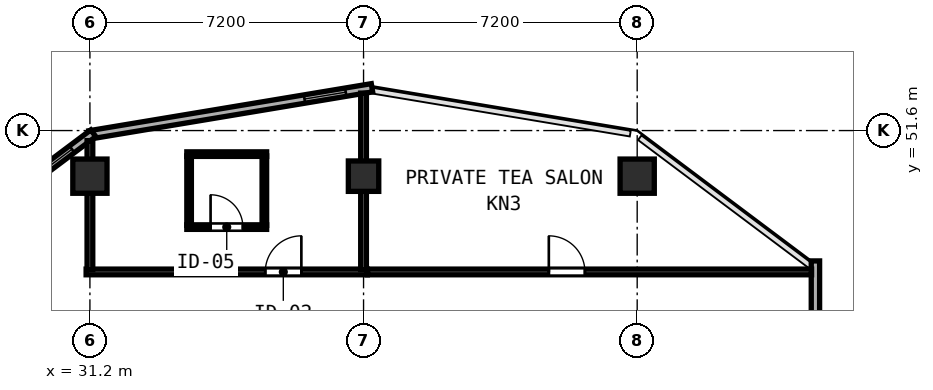
"""IFC4 building model, lengths in metres.
Left out: names, types, materials, properties, quantities, classifications, styles, units other than length and angle.
Written with IfcOpenShell. Run it as: python <this file> out.ifc"""

import sys

from ifc_helpers import new_model, si_unit, direction, frame, frame_2d, origin, origin_2d, place, context, subcontext, project, spatial, rectangle, hollow_rectangle, extrude, element, fill, save


model = new_model("IFC4")
c1 = context("Model", 3, precision=1e-05, world=origin(), true_north=direction((0.0, 1.0)))
c2 = subcontext(c1, "Body", "Model", "MODEL_VIEW")
j1 = project(units=[si_unit("LENGTHUNIT", "METRE"), si_unit("PLANEANGLEUNIT", "RADIAN")], contexts=[c1])
p1 = place(None, origin())
s1 = spatial("IfcSite", under=j1, at=p1, CompositionType="ELEMENT")
p2 = place(p1, origin())
s2 = spatial("IfcBuilding", under=s1, at=p2, CompositionType="ELEMENT")
p3 = place(p2, frame((0.0, 0.0, 223.0)))
s3 = spatial("IfcBuildingStorey", under=s2, at=p3, CompositionType="ELEMENT", Elevation=223.0)
for number, where, z_axis, x_axis in (
    (1, (31.2, 50.4, 0.0), (0.0, 0.0, 1.0), (1.0, 0.0, 0.0)),
    (2, (45.6, 50.4, 0.0), (0.0, 0.0, 1.0), (1.0, 0.0, 0.0)),
):
    element("IfcColumn", number, at=place(p3, frame(where, z_axis=z_axis, x_axis=x_axis)), inside=s3, PredefinedType="COLUMN", context=c2, shape_type="SweptSolid", body=[
        extrude(hollow_rectangle(XDim=0.9, YDim=0.9, WallThickness=0.034, at=origin_2d()), origin(), (0.0, 0.0, 1.0), 3.8),
    ])
p4 = place(p3, frame((38.4, 50.4, 0.0), z_axis=(0.0, 0.0, 1.0), x_axis=(1.0, 0.0, 0.0)))
e3 = element("IfcColumn", 3, at=p4, inside=s3, PredefinedType="COLUMN", context=c2, shape_type="SweptSolid", body=[
    extrude(hollow_rectangle(XDim=0.8, YDim=0.8, WallThickness=0.03, at=origin_2d()), origin(), (0.0, 0.0, 1.0), 3.8),
])
p5 = place(p3, frame((50.29, 46.635, 0.0), z_axis=(0.0, 0.0, 1.0), x_axis=(0.0, 1.0, 0.0)))
e4 = element("IfcWall", 4, at=p5, inside=s3, PredefinedType="SOLIDWALL", context=c2, shape_type="SweptSolid", body=[
    extrude(rectangle(XDim=1.535, YDim=0.22, at=frame_2d((0.768, 0.0))), origin(), (0.0, 0.0, 1.0), 3.62),
])
p6 = place(p3, frame((38.622, 52.726, 0.0), z_axis=(0.0, 0.0, 1.0), x_axis=(-0.986390420428, -0.164420006349, 0.0)))
e5 = element("IfcWall", 5, at=p6, inside=s3, PredefinedType="SOLIDWALL", context=c2, shape_type="SweptSolid", body=[
    extrude(rectangle(XDim=7.534, YDim=0.22, at=frame_2d((3.767, 0.0))), origin(), (0.0, 0.0, 1.0), 3.62),
])
p7 = place(p6, frame((0.7, 0.0, 0.85)))
e6 = element("IfcOpeningElement", 6, at=p7, cuts=e5, PredefinedType="OPENING", context=c2, shape_type="SweptSolid", body=[
    extrude(rectangle(XDim=1.1, YDim=1.75, at=frame_2d((0.55, 0.875))), frame((0.0, 0.12, 0.0), z_axis=(0.0, -1.0, 0.0), x_axis=(1.0, 0.0, 0.0)), (0.0, 0.0, 1.0), 0.24),
])
p8 = place(p3, frame((31.289, 51.529, 0.0), z_axis=(0.0, 0.0, 1.0), x_axis=(-0.800014580093, -0.599980559383, 0.0)))
e7 = element("IfcWall", 7, at=p8, inside=s3, PredefinedType="SOLIDWALL", context=c2, shape_type="SweptSolid", body=[
    extrude(rectangle(XDim=6.028, YDim=0.22, at=frame_2d((3.014, 0.0))), origin(), (0.0, 0.0, 1.0), 3.62),
])
p9 = place(p8, frame((0.7, 0.0, 0.85)))
e8 = element("IfcOpeningElement", 8, at=p9, cuts=e7, PredefinedType="OPENING", context=c2, shape_type="SweptSolid", body=[
    extrude(rectangle(XDim=1.1, YDim=1.75, at=frame_2d((0.55, 0.875))), frame((0.0, 0.12, 0.0), z_axis=(0.0, -1.0, 0.0), x_axis=(1.0, 0.0, 0.0)), (0.0, 0.0, 1.0), 0.24),
])
p10 = place(p3, frame((31.1, 47.88, 0.0), z_axis=(0.0, 0.0, 1.0), x_axis=(1.0, 0.0, 0.0)))
e9 = element("IfcWall", 9, at=p10, inside=s3, PredefinedType="PARTITIONING", context=c2, shape_type="SweptSolid", body=[
    extrude(rectangle(XDim=7.4, YDim=0.15, at=frame_2d((3.7, 0.0))), origin(), (0.0, 0.0, 1.0), 3.62),
])
p11 = place(p10, frame((4.714, 0.0, 0.0)))
e10 = element("IfcOpeningElement", 10, at=p11, cuts=e9, PredefinedType="OPENING", context=c2, shape_type="SweptSolid", body=[
    extrude(rectangle(XDim=0.95, YDim=2.15, at=frame_2d((0.475, 1.075))), frame((0.0, 0.085, 0.0), z_axis=(0.0, -1.0, 0.0), x_axis=(1.0, 0.0, 0.0)), (0.0, 0.0, 1.0), 0.17),
])
p12 = place(p3, frame((31.2, 47.94, 0.0), z_axis=(0.0, 0.0, 1.0), x_axis=(0.0, 1.0, 0.0)))
e11 = element("IfcWall", 11, at=p12, inside=s3, PredefinedType="PARTITIONING", context=c2, shape_type="SweptSolid", body=[
    extrude(rectangle(XDim=3.395, YDim=0.15, at=frame_2d((1.698, 0.0))), origin(), (0.0, 0.0, 1.0), 3.105),
])
p13 = place(p3, frame((38.4, 47.94, 0.0), z_axis=(0.0, 0.0, 1.0), x_axis=(0.0, 1.0, 0.0)))
e12 = element("IfcWall", 12, at=p13, inside=s3, PredefinedType="PARTITIONING", context=c2, shape_type="SweptSolid", body=[
    extrude(rectangle(XDim=4.645, YDim=0.15, at=frame_2d((2.323, 0.0))), origin(), (0.0, 0.0, 1.0), 3.62),
])
p14 = place(p3, frame((33.75, 50.98, 0.0), z_axis=(0.0, 0.0, 1.0), x_axis=(1.0, 0.0, 0.0)))
e13 = element("IfcWall", 13, at=p14, inside=s3, PredefinedType="PARTITIONING", context=c2, shape_type="SweptSolid", body=[
    extrude(rectangle(XDim=2.1, YDim=0.12, at=frame_2d((1.05, 0.0))), origin(), (0.0, 0.0, 1.0), 3.62),
])
p15 = place(p3, frame((33.75, 49.06, 0.0), z_axis=(0.0, 0.0, 1.0), x_axis=(1.0, 0.0, 0.0)))
e14 = element("IfcWall", 14, at=p15, inside=s3, PredefinedType="PARTITIONING", context=c2, shape_type="SweptSolid", body=[
    extrude(rectangle(XDim=2.1, YDim=0.12, at=frame_2d((1.05, 0.0))), origin(), (0.0, 0.0, 1.0), 3.62),
])
p16 = place(p15, frame((0.625, 0.0, 0.0)))
e15 = element("IfcOpeningElement", 15, at=p16, cuts=e14, PredefinedType="OPENING", context=c2, shape_type="SweptSolid", body=[
    extrude(rectangle(XDim=0.85, YDim=2.1, at=frame_2d((0.425, 1.05))), frame((0.0, 0.07, 0.0), z_axis=(0.0, -1.0, 0.0), x_axis=(1.0, 0.0, 0.0)), (0.0, 0.0, 1.0), 0.14),
])
for number, where, z_axis, x_axis in (
    (16, (33.81, 49.105, 0.0), (0.0, 0.0, 1.0), (0.0, 1.0, 0.0)),
    (17, (35.79, 49.105, 0.0), (0.0, 0.0, 1.0), (0.0, 1.0, 0.0)),
):
    element("IfcWall", number, at=place(p3, frame(where, z_axis=z_axis, x_axis=x_axis)), inside=s3, PredefinedType="PARTITIONING", context=c2, shape_type="SweptSolid", body=[
        extrude(rectangle(XDim=1.83, YDim=0.12, at=frame_2d((0.915, 0.0))), origin(), (0.0, 0.0, 1.0), 3.62),
    ])
p17 = place(p3, frame((38.502, 47.88, 0.0), z_axis=(0.0, 0.0, 1.0), x_axis=(1.0, 0.0, 0.0)))
e18 = element("IfcWall", 18, at=p17, inside=s3, PredefinedType="PARTITIONING", context=c2, shape_type="SweptSolid", body=[
    extrude(rectangle(XDim=11.686, YDim=0.15, at=frame_2d((5.843, 0.0))), origin(), (0.0, 0.0, 1.0), 3.62),
])
p18 = place(p17, frame((4.773, 0.0, 0.0)))
e19 = element("IfcOpeningElement", 19, at=p18, cuts=e18, PredefinedType="OPENING", context=c2, shape_type="SweptSolid", body=[
    extrude(rectangle(XDim=0.95, YDim=2.12, at=frame_2d((0.475, 1.06))), frame((0.0, 0.085, 0.0), z_axis=(0.0, -1.0, 0.0), x_axis=(1.0, 0.0, 0.0)), (0.0, 0.0, 1.0), 0.17),
])
p19 = place(p7, origin())
e20 = element("IfcWindow", 20, at=p19, inside=s3, PartitioningType="SINGLE_PANEL", PredefinedType="WINDOW", context=c2, shape_type="SweptSolid", body=[
    extrude(rectangle(XDim=1.1, YDim=1.75, at=frame_2d((0.55, 0.875))), frame((0.0, 0.03, 0.0), z_axis=(0.0, -1.0, 0.0), x_axis=(1.0, 0.0, 0.0)), (0.0, 0.0, 1.0), 0.06),
])
fill(e6, e20)
p20 = place(p9, origin())
e21 = element("IfcWindow", 21, at=p20, inside=s3, PartitioningType="SINGLE_PANEL", PredefinedType="WINDOW", context=c2, shape_type="SweptSolid", body=[
    extrude(rectangle(XDim=1.1, YDim=1.75, at=frame_2d((0.55, 0.875))), frame((0.0, 0.03, 0.0), z_axis=(0.0, -1.0, 0.0), x_axis=(1.0, 0.0, 0.0)), (0.0, 0.0, 1.0), 0.06),
])
fill(e8, e21)
p21 = place(p11, origin())
e22 = element("IfcDoor", 22, at=p21, inside=s3, OperationType="SINGLE_SWING_RIGHT", PredefinedType="DOOR", context=c2, shape_type="SweptSolid", body=[
    extrude(rectangle(XDim=0.95, YDim=2.15, at=frame_2d((0.475, 1.075))), frame((0.0, 0.025, 0.0), z_axis=(0.0, -1.0, 0.0), x_axis=(1.0, 0.0, 0.0)), (0.0, 0.0, 1.0), 0.05),
])
fill(e10, e22)
p22 = place(p16, origin())
e23 = element("IfcDoor", 23, at=p22, inside=s3, OperationType="SINGLE_SWING_LEFT", PredefinedType="DOOR", context=c2, shape_type="SweptSolid", body=[
    extrude(rectangle(XDim=0.85, YDim=2.1, at=frame_2d((0.425, 1.05))), frame((0.0, 0.025, 0.0), z_axis=(0.0, -1.0, 0.0), x_axis=(1.0, 0.0, 0.0)), (0.0, 0.0, 1.0), 0.05),
])
fill(e15, e23)
p23 = place(p18, origin())
e24 = element("IfcDoor", 24, at=p23, inside=s3, OperationType="SINGLE_SWING_LEFT", PredefinedType="DOOR", context=c2, shape_type="SweptSolid", body=[
    extrude(rectangle(XDim=0.95, YDim=2.12, at=frame_2d((0.475, 1.06))), frame((0.0, 0.025, 0.0), z_axis=(0.0, -1.0, 0.0), x_axis=(1.0, 0.0, 0.0)), (0.0, 0.0, 1.0), 0.05),
])
fill(e19, e24)
save(model, sys.argv[1])
